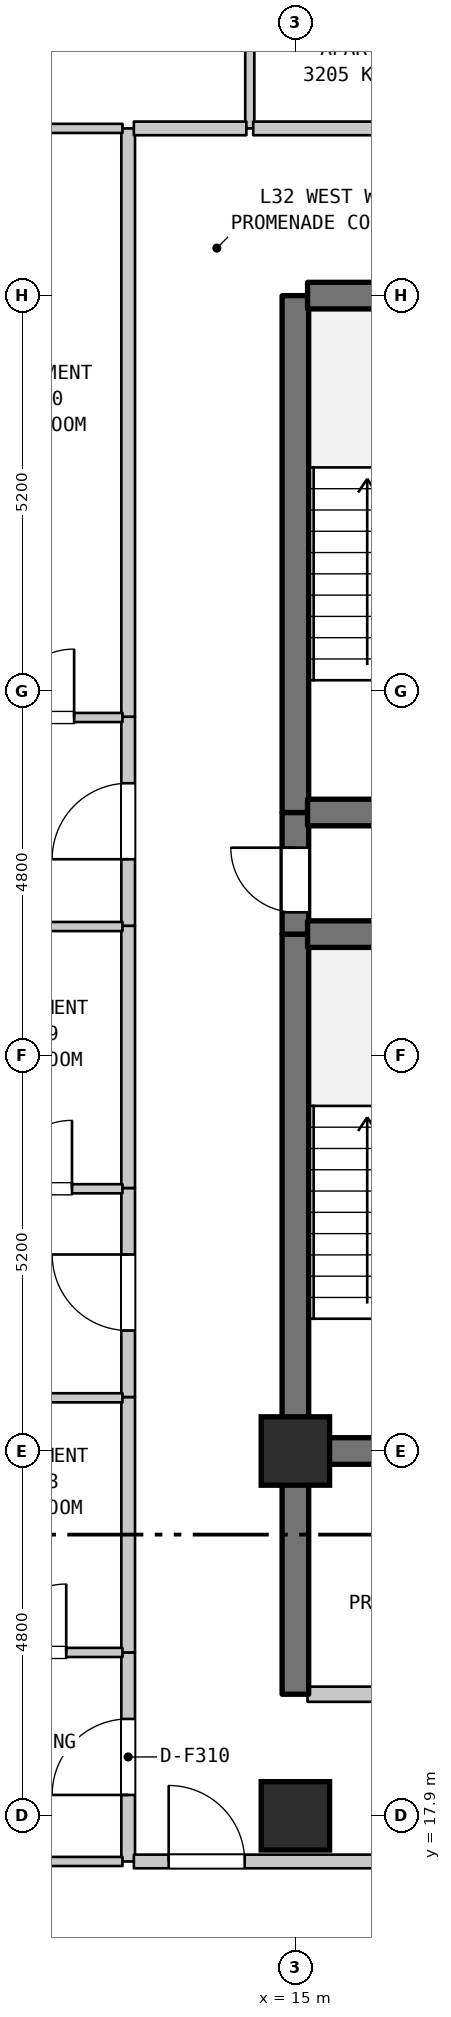
"""IFC4 building model, lengths in metres.
Left out: names, types, materials, properties, quantities, classifications, styles, units other than length and angle.
Written with IfcOpenShell. Run it as: python <this file> out.ifc"""

import sys

from ifc_helpers import new_model, si_unit, direction, frame, frame_2d, origin, origin_2d, place, context, subcontext, project, spatial, rectangle, extrude, element, fill, save


model = new_model("IFC4")
c1 = context("Model", 3, precision=1e-05, world=origin(), true_north=direction((0.0, 1.0)))
c2 = subcontext(c1, "Body", "Model", "MODEL_VIEW")
j1 = project(units=[si_unit("LENGTHUNIT", "METRE"), si_unit("PLANEANGLEUNIT", "RADIAN")], contexts=[c1])
p1 = place(None, origin())
s1 = spatial("IfcSite", under=j1, at=p1, CompositionType="ELEMENT")
p2 = place(p1, origin())
s2 = spatial("IfcBuilding", under=s1, at=p2, CompositionType="ELEMENT")
p3 = place(p2, frame((0.0, 0.0, 133.5)))
s3 = spatial("IfcBuildingStorey", under=s2, at=p3, CompositionType="ELEMENT", Elevation=133.5)
for number, where, z_axis, x_axis in (
    (1, (15.0, 17.9, 0.0), (0.0, 0.0, 1.0), (1.0, 0.0, 0.0)),
    (2, (15.0, 22.7, 0.0), (0.0, 0.0, 1.0), (1.0, 0.0, 0.0)),
):
    element("IfcColumn", number, at=place(p3, frame(where, z_axis=z_axis, x_axis=x_axis)), inside=s3, PredefinedType="COLUMN", context=c2, shape_type="SweptSolid", body=[
        extrude(rectangle(XDim=0.9, YDim=0.9, at=origin_2d()), origin(), (0.0, 0.0, 1.0), 3.7),
    ])
p4 = place(p3, frame((12.8, 17.3, 0.0), z_axis=(0.0, 0.0, 1.0), x_axis=(0.0, 1.0, 0.0)))
e3 = element("IfcWall", 3, at=p4, inside=s3, PredefinedType="STANDARD", context=c2, shape_type="SweptSolid", body=[
    extrude(rectangle(XDim=2.75, YDim=0.18, at=frame_2d((1.375, 0.0))), origin(), (0.0, 0.0, 1.0), 3.385),
])
p5 = place(p4, frame((0.875, 0.0, 0.0)))
e4 = element("IfcOpeningElement", 4, at=p5, cuts=e3, PredefinedType="OPENING", context=c2, shape_type="SweptSolid", body=[
    extrude(rectangle(XDim=1.0, YDim=2.15, at=frame_2d((0.5, 1.075))), frame((0.0, 0.1, 0.0), z_axis=(0.0, -1.0, 0.0), x_axis=(1.0, 0.0, 0.0)), (0.0, 0.0, 1.0), 0.2),
])
p6 = place(p3, frame((12.8, 20.05, 0.0), z_axis=(0.0, 0.0, 1.0), x_axis=(0.0, 1.0, 0.0)))
e5 = element("IfcWall", 5, at=p6, inside=s3, PredefinedType="STANDARD", context=c2, shape_type="SweptSolid", body=[
    extrude(rectangle(XDim=3.36, YDim=0.18, at=frame_2d((1.68, 0.0))), origin(), (0.0, 0.0, 1.0), 3.385),
])
p7 = place(p3, frame((12.8, 23.41, 0.0), z_axis=(0.0, 0.0, 1.0), x_axis=(0.0, 1.0, 0.0)))
e6 = element("IfcWall", 6, at=p7, inside=s3, PredefinedType="STANDARD", context=c2, shape_type="SweptSolid", body=[
    extrude(rectangle(XDim=2.75, YDim=0.18, at=frame_2d((1.375, 0.0))), origin(), (0.0, 0.0, 1.0), 3.385),
])
p8 = place(p7, frame((0.875, 0.0, 0.0)))
e7 = element("IfcOpeningElement", 7, at=p8, cuts=e6, PredefinedType="OPENING", context=c2, shape_type="SweptSolid", body=[
    extrude(rectangle(XDim=1.0, YDim=2.15, at=frame_2d((0.5, 1.075))), frame((0.0, 0.1, 0.0), z_axis=(0.0, -1.0, 0.0), x_axis=(1.0, 0.0, 0.0)), (0.0, 0.0, 1.0), 0.2),
])
p9 = place(p3, frame((12.8, 26.16, 0.0), z_axis=(0.0, 0.0, 1.0), x_axis=(0.0, 1.0, 0.0)))
e8 = element("IfcWall", 8, at=p9, inside=s3, PredefinedType="STANDARD", context=c2, shape_type="SweptSolid", body=[
    extrude(rectangle(XDim=3.45, YDim=0.18, at=frame_2d((1.725, 0.0))), origin(), (0.0, 0.0, 1.0), 3.385),
])
p10 = place(p3, frame((12.8, 29.61, 0.0), z_axis=(0.0, 0.0, 1.0), x_axis=(0.0, 1.0, 0.0)))
e9 = element("IfcWall", 9, at=p10, inside=s3, PredefinedType="STANDARD", context=c2, shape_type="SweptSolid", body=[
    extrude(rectangle(XDim=2.75, YDim=0.18, at=frame_2d((1.375, 0.0))), origin(), (0.0, 0.0, 1.0), 3.385),
])
p11 = place(p10, frame((0.875, 0.0, 0.0)))
e10 = element("IfcOpeningElement", 10, at=p11, cuts=e9, PredefinedType="OPENING", context=c2, shape_type="SweptSolid", body=[
    extrude(rectangle(XDim=1.0, YDim=2.15, at=frame_2d((0.5, 1.075))), frame((0.0, 0.1, 0.0), z_axis=(0.0, -1.0, 0.0), x_axis=(1.0, 0.0, 0.0)), (0.0, 0.0, 1.0), 0.2),
])
p12 = place(p3, frame((12.8, 32.36, 0.0), z_axis=(0.0, 0.0, 1.0), x_axis=(0.0, 1.0, 0.0)))
e11 = element("IfcWall", 11, at=p12, inside=s3, PredefinedType="STANDARD", context=c2, shape_type="SweptSolid", body=[
    extrude(rectangle(XDim=7.74, YDim=0.18, at=frame_2d((3.87, 0.0))), origin(), (0.0, 0.0, 1.0), 3.385),
])
p13 = place(p3, frame((14.4, 40.1, 0.0), z_axis=(0.0, 0.0, 1.0), x_axis=(0.0, 1.0, 0.0)))
e12 = element("IfcWall", 12, at=p13, inside=s3, PredefinedType="PARTITIONING", context=c2, shape_type="SweptSolid", body=[
    extrude(rectangle(XDim=2.3, YDim=0.12, at=frame_2d((1.15, 0.0))), origin(), (0.0, 0.0, 1.0), 3.385),
])
p14 = place(p3, frame((15.0, 19.5, 0.0), z_axis=(0.0, 0.0, 1.0), x_axis=(0.0, 1.0, 0.0)))
e13 = element("IfcWall", 13, at=p14, inside=s3, PredefinedType="SHEAR", context=c2, shape_type="SweptSolid", body=[
    extrude(rectangle(XDim=3.2, YDim=0.35, at=frame_2d((1.6, 0.0))), origin(), (0.0, 0.0, 1.0), 3.385),
])
p15 = place(p3, frame((15.0, 22.7, 0.0), z_axis=(0.0, 0.0, 1.0), x_axis=(0.0, 1.0, 0.0)))
e14 = element("IfcWall", 14, at=p15, inside=s3, PredefinedType="SHEAR", context=c2, shape_type="SweptSolid", body=[
    extrude(rectangle(XDim=6.8, YDim=0.35, at=frame_2d((3.4, 0.0))), origin(), (0.0, 0.0, 1.0), 3.385),
])
p16 = place(p3, frame((15.0, 29.5, 0.0), z_axis=(0.0, 0.0, 1.0), x_axis=(0.0, 1.0, 0.0)))
e15 = element("IfcWall", 15, at=p16, inside=s3, PredefinedType="SHEAR", context=c2, shape_type="SweptSolid", body=[
    extrude(rectangle(XDim=1.6, YDim=0.35, at=frame_2d((0.8, 0.0))), origin(), (0.0, 0.0, 1.0), 3.385),
])
p17 = place(p16, frame((0.287, 0.0, 0.0)))
e16 = element("IfcOpeningElement", 16, at=p17, cuts=e15, PredefinedType="OPENING", context=c2, shape_type="SweptSolid", body=[
    extrude(rectangle(XDim=0.85, YDim=2.1, at=frame_2d((0.425, 1.05))), frame((0.0, 0.185, 0.0), z_axis=(0.0, -1.0, 0.0), x_axis=(1.0, 0.0, 0.0)), (0.0, 0.0, 1.0), 0.37),
])
p18 = place(p3, frame((15.0, 31.1, 0.0), z_axis=(0.0, 0.0, 1.0), x_axis=(0.0, 1.0, 0.0)))
e17 = element("IfcWall", 17, at=p18, inside=s3, PredefinedType="SHEAR", context=c2, shape_type="SweptSolid", body=[
    extrude(rectangle(XDim=6.8, YDim=0.35, at=frame_2d((3.4, 0.0))), origin(), (0.0, 0.0, 1.0), 3.385),
])
p19 = place(p3, frame((9.085, 17.3, 0.0), z_axis=(0.0, 0.0, 1.0), x_axis=(1.0, 0.0, 0.0)))
e18 = element("IfcWall", 18, at=p19, inside=s3, PredefinedType="PARTITIONING", context=c2, shape_type="SweptSolid", body=[
    extrude(rectangle(XDim=3.64, YDim=0.12, at=frame_2d((1.82, 0.0))), origin(), (0.0, 0.0, 1.0), 3.385),
])
p20 = place(p3, frame((12.875, 17.3, 0.0), z_axis=(0.0, 0.0, 1.0), x_axis=(1.0, 0.0, 0.0)))
e19 = element("IfcWall", 19, at=p20, inside=s3, PredefinedType="STANDARD", context=c2, shape_type="SweptSolid", body=[
    extrude(rectangle(XDim=3.78, YDim=0.18, at=frame_2d((1.89, 0.0))), origin(), (0.0, 0.0, 1.0), 3.385),
])
p21 = place(p20, frame((0.458, 0.0, 0.0)))
e20 = element("IfcOpeningElement", 20, at=p21, cuts=e19, PredefinedType="OPENING", context=c2, shape_type="SweptSolid", body=[
    extrude(rectangle(XDim=1.0, YDim=2.15, at=frame_2d((0.5, 1.075))), frame((0.0, 0.1, 0.0), z_axis=(0.0, -1.0, 0.0), x_axis=(1.0, 0.0, 0.0)), (0.0, 0.0, 1.0), 0.2),
])
p22 = place(p3, frame((15.16, 19.5, 0.0), z_axis=(0.0, 0.0, 1.0), x_axis=(1.0, 0.0, 0.0)))
e21 = element("IfcWall", 21, at=p22, inside=s3, PredefinedType="STANDARD", context=c2, shape_type="SweptSolid", body=[
    extrude(rectangle(XDim=3.68, YDim=0.2, at=frame_2d((1.84, 0.0))), origin(), (0.0, 0.0, 1.0), 3.385),
])
p23 = place(p22, frame((1.39, 0.0, 0.0)))
e22 = element("IfcOpeningElement", 22, at=p23, cuts=e21, PredefinedType="OPENING", context=c2, shape_type="SweptSolid", body=[
    extrude(rectangle(XDim=0.9, YDim=2.15, at=frame_2d((0.45, 1.075))), frame((0.0, 0.11, 0.0), z_axis=(0.0, -1.0, 0.0), x_axis=(1.0, 0.0, 0.0)), (0.0, 0.0, 1.0), 0.22),
])
p24 = place(p3, frame((10.456, 20.05, 0.0), z_axis=(0.0, 0.0, 1.0), x_axis=(1.0, 0.0, 0.0)))
e23 = element("IfcWall", 23, at=p24, inside=s3, PredefinedType="PARTITIONING", context=c2, shape_type="SweptSolid", body=[
    extrude(rectangle(XDim=2.269, YDim=0.12, at=frame_2d((1.135, 0.0))), origin(), (0.0, 0.0, 1.0), 3.385),
])
p25 = place(p24, frame((0.629, 0.0, 0.0)))
e24 = element("IfcOpeningElement", 24, at=p25, cuts=e23, PredefinedType="OPENING", context=c2, shape_type="SweptSolid", body=[
    extrude(rectangle(XDim=0.9, YDim=2.1, at=frame_2d((0.45, 1.05))), frame((0.0, 0.07, 0.0), z_axis=(0.0, -1.0, 0.0), x_axis=(1.0, 0.0, 0.0)), (0.0, 0.0, 1.0), 0.14),
])
p26 = place(p3, frame((15.16, 22.7, 0.0), z_axis=(0.0, 0.0, 1.0), x_axis=(1.0, 0.0, 0.0)))
e25 = element("IfcWall", 25, at=p26, inside=s3, PredefinedType="SHEAR", context=c2, shape_type="SweptSolid", body=[
    extrude(rectangle(XDim=3.68, YDim=0.35, at=frame_2d((1.84, 0.0))), origin(), (0.0, 0.0, 1.0), 3.385),
])
p27 = place(p3, frame((10.456, 23.4, 0.0), z_axis=(0.0, 0.0, 1.0), x_axis=(1.0, 0.0, 0.0)))
e26 = element("IfcWall", 26, at=p27, inside=s3, PredefinedType="PARTITIONING", context=c2, shape_type="SweptSolid", body=[
    extrude(rectangle(XDim=2.269, YDim=0.12, at=frame_2d((1.135, 0.0))), origin(), (0.0, 0.0, 1.0), 3.385),
])
p28 = place(p3, frame((10.466, 26.15, 0.0), z_axis=(0.0, 0.0, 1.0), x_axis=(1.0, 0.0, 0.0)))
e27 = element("IfcWall", 27, at=p28, inside=s3, PredefinedType="PARTITIONING", context=c2, shape_type="SweptSolid", body=[
    extrude(rectangle(XDim=2.259, YDim=0.12, at=frame_2d((1.129, 0.0))), origin(), (0.0, 0.0, 1.0), 3.385),
])
p29 = place(p28, frame((0.695, 0.0, 0.0)))
e28 = element("IfcOpeningElement", 28, at=p29, cuts=e27, PredefinedType="OPENING", context=c2, shape_type="SweptSolid", body=[
    extrude(rectangle(XDim=0.9, YDim=2.1, at=frame_2d((0.45, 1.05))), frame((0.0, 0.07, 0.0), z_axis=(0.0, -1.0, 0.0), x_axis=(1.0, 0.0, 0.0)), (0.0, 0.0, 1.0), 0.14),
])
p30 = place(p3, frame((15.16, 29.5, 0.0), z_axis=(0.0, 0.0, 1.0), x_axis=(1.0, 0.0, 0.0)))
e29 = element("IfcWall", 29, at=p30, inside=s3, PredefinedType="SHEAR", context=c2, shape_type="SweptSolid", body=[
    extrude(rectangle(XDim=3.68, YDim=0.35, at=frame_2d((1.84, 0.0))), origin(), (0.0, 0.0, 1.0), 3.385),
])
p31 = place(p3, frame((10.466, 29.6, 0.0), z_axis=(0.0, 0.0, 1.0), x_axis=(1.0, 0.0, 0.0)))
e30 = element("IfcWall", 30, at=p31, inside=s3, PredefinedType="PARTITIONING", context=c2, shape_type="SweptSolid", body=[
    extrude(rectangle(XDim=2.259, YDim=0.12, at=frame_2d((1.129, 0.0))), origin(), (0.0, 0.0, 1.0), 3.385),
])
p32 = place(p3, frame((15.16, 31.1, 0.0), z_axis=(0.0, 0.0, 1.0), x_axis=(1.0, 0.0, 0.0)))
e31 = element("IfcWall", 31, at=p32, inside=s3, PredefinedType="SHEAR", context=c2, shape_type="SweptSolid", body=[
    extrude(rectangle(XDim=3.68, YDim=0.35, at=frame_2d((1.84, 0.0))), origin(), (0.0, 0.0, 1.0), 3.385),
])
p33 = place(p3, frame((10.523, 32.35, 0.0), z_axis=(0.0, 0.0, 1.0), x_axis=(1.0, 0.0, 0.0)))
e32 = element("IfcWall", 32, at=p33, inside=s3, PredefinedType="PARTITIONING", context=c2, shape_type="SweptSolid", body=[
    extrude(rectangle(XDim=2.202, YDim=0.12, at=frame_2d((1.101, 0.0))), origin(), (0.0, 0.0, 1.0), 3.385),
])
p34 = place(p33, frame((0.666, 0.0, 0.0)))
e33 = element("IfcOpeningElement", 33, at=p34, cuts=e32, PredefinedType="OPENING", context=c2, shape_type="SweptSolid", body=[
    extrude(rectangle(XDim=0.9, YDim=2.1, at=frame_2d((0.45, 1.05))), frame((0.0, 0.07, 0.0), z_axis=(0.0, -1.0, 0.0), x_axis=(1.0, 0.0, 0.0)), (0.0, 0.0, 1.0), 0.14),
])
p35 = place(p3, frame((15.16, 37.9, 0.0), z_axis=(0.0, 0.0, 1.0), x_axis=(1.0, 0.0, 0.0)))
e34 = element("IfcWall", 34, at=p35, inside=s3, PredefinedType="SHEAR", context=c2, shape_type="SweptSolid", body=[
    extrude(rectangle(XDim=3.68, YDim=0.35, at=frame_2d((1.84, 0.0))), origin(), (0.0, 0.0, 1.0), 3.385),
])
p36 = place(p3, frame((10.523, 40.1, 0.0), z_axis=(0.0, 0.0, 1.0), x_axis=(1.0, 0.0, 0.0)))
e35 = element("IfcWall", 35, at=p36, inside=s3, PredefinedType="PARTITIONING", context=c2, shape_type="SweptSolid", body=[
    extrude(rectangle(XDim=2.202, YDim=0.12, at=frame_2d((1.101, 0.0))), origin(), (0.0, 0.0, 1.0), 3.385),
])
p37 = place(p3, frame((12.875, 40.1, 0.0), z_axis=(0.0, 0.0, 1.0), x_axis=(1.0, 0.0, 0.0)))
e36 = element("IfcWall", 36, at=p37, inside=s3, PredefinedType="STANDARD", context=c2, shape_type="SweptSolid", body=[
    extrude(rectangle(XDim=1.48, YDim=0.18, at=frame_2d((0.74, 0.0))), origin(), (0.0, 0.0, 1.0), 3.385),
])
p38 = place(p3, frame((14.445, 40.1, 0.0), z_axis=(0.0, 0.0, 1.0), x_axis=(1.0, 0.0, 0.0)))
e37 = element("IfcWall", 37, at=p38, inside=s3, PredefinedType="STANDARD", context=c2, shape_type="SweptSolid", body=[
    extrude(rectangle(XDim=2.684, YDim=0.18, at=frame_2d((1.342, 0.0))), origin(), (0.0, 0.0, 1.0), 3.385),
])
p39 = place(p5, origin())
e38 = element("IfcDoor", 38, at=p39, inside=s3, OperationType="SINGLE_SWING_LEFT", PredefinedType="DOOR", context=c2, shape_type="SweptSolid", body=[
    extrude(rectangle(XDim=1.0, YDim=2.15, at=frame_2d((0.5, 1.075))), frame((0.0, 0.025, 0.0), z_axis=(0.0, -1.0, 0.0), x_axis=(1.0, 0.0, 0.0)), (0.0, 0.0, 1.0), 0.05),
])
fill(e4, e38)
p40 = place(p8, origin())
e39 = element("IfcDoor", 39, at=p40, inside=s3, OperationType="SINGLE_SWING_RIGHT", PredefinedType="DOOR", context=c2, shape_type="SweptSolid", body=[
    extrude(rectangle(XDim=1.0, YDim=2.15, at=frame_2d((0.5, 1.075))), frame((0.0, 0.025, 0.0), z_axis=(0.0, -1.0, 0.0), x_axis=(1.0, 0.0, 0.0)), (0.0, 0.0, 1.0), 0.05),
])
fill(e7, e39)
p41 = place(p11, origin())
e40 = element("IfcDoor", 40, at=p41, inside=s3, OperationType="SINGLE_SWING_LEFT", PredefinedType="DOOR", context=c2, shape_type="SweptSolid", body=[
    extrude(rectangle(XDim=1.0, YDim=2.15, at=frame_2d((0.5, 1.075))), frame((0.0, 0.025, 0.0), z_axis=(0.0, -1.0, 0.0), x_axis=(1.0, 0.0, 0.0)), (0.0, 0.0, 1.0), 0.05),
])
fill(e10, e40)
p42 = place(p17, origin())
e41 = element("IfcDoor", 41, at=p42, inside=s3, OperationType="SINGLE_SWING_RIGHT", PredefinedType="DOOR", context=c2, shape_type="SweptSolid", body=[
    extrude(rectangle(XDim=0.85, YDim=2.1, at=frame_2d((0.425, 1.05))), frame((0.0, 0.025, 0.0), z_axis=(0.0, -1.0, 0.0), x_axis=(1.0, 0.0, 0.0)), (0.0, 0.0, 1.0), 0.05),
])
fill(e16, e41)
p43 = place(p21, origin())
e42 = element("IfcDoor", 42, at=p43, inside=s3, OperationType="SINGLE_SWING_LEFT", PredefinedType="DOOR", context=c2, shape_type="SweptSolid", body=[
    extrude(rectangle(XDim=1.0, YDim=2.15, at=frame_2d((0.5, 1.075))), frame((0.0, 0.025, 0.0), z_axis=(0.0, -1.0, 0.0), x_axis=(1.0, 0.0, 0.0)), (0.0, 0.0, 1.0), 0.05),
])
fill(e20, e42)
p44 = place(p25, origin())
e43 = element("IfcDoor", 43, at=p44, inside=s3, OperationType="SINGLE_SWING_RIGHT", PredefinedType="DOOR", context=c2, shape_type="SweptSolid", body=[
    extrude(rectangle(XDim=0.9, YDim=2.1, at=frame_2d((0.45, 1.05))), frame((0.0, 0.025, 0.0), z_axis=(0.0, -1.0, 0.0), x_axis=(1.0, 0.0, 0.0)), (0.0, 0.0, 1.0), 0.05),
])
fill(e24, e43)
p45 = place(p29, origin())
e44 = element("IfcDoor", 44, at=p45, inside=s3, OperationType="SINGLE_SWING_RIGHT", PredefinedType="DOOR", context=c2, shape_type="SweptSolid", body=[
    extrude(rectangle(XDim=0.9, YDim=2.1, at=frame_2d((0.45, 1.05))), frame((0.0, 0.025, 0.0), z_axis=(0.0, -1.0, 0.0), x_axis=(1.0, 0.0, 0.0)), (0.0, 0.0, 1.0), 0.05),
])
fill(e28, e44)
p46 = place(p34, origin())
e45 = element("IfcDoor", 45, at=p46, inside=s3, OperationType="SINGLE_SWING_RIGHT", PredefinedType="DOOR", context=c2, shape_type="SweptSolid", body=[
    extrude(rectangle(XDim=0.9, YDim=2.1, at=frame_2d((0.45, 1.05))), frame((0.0, 0.025, 0.0), z_axis=(0.0, -1.0, 0.0), x_axis=(1.0, 0.0, 0.0)), (0.0, 0.0, 1.0), 0.05),
])
fill(e33, e45)
save(model, sys.argv[1])
